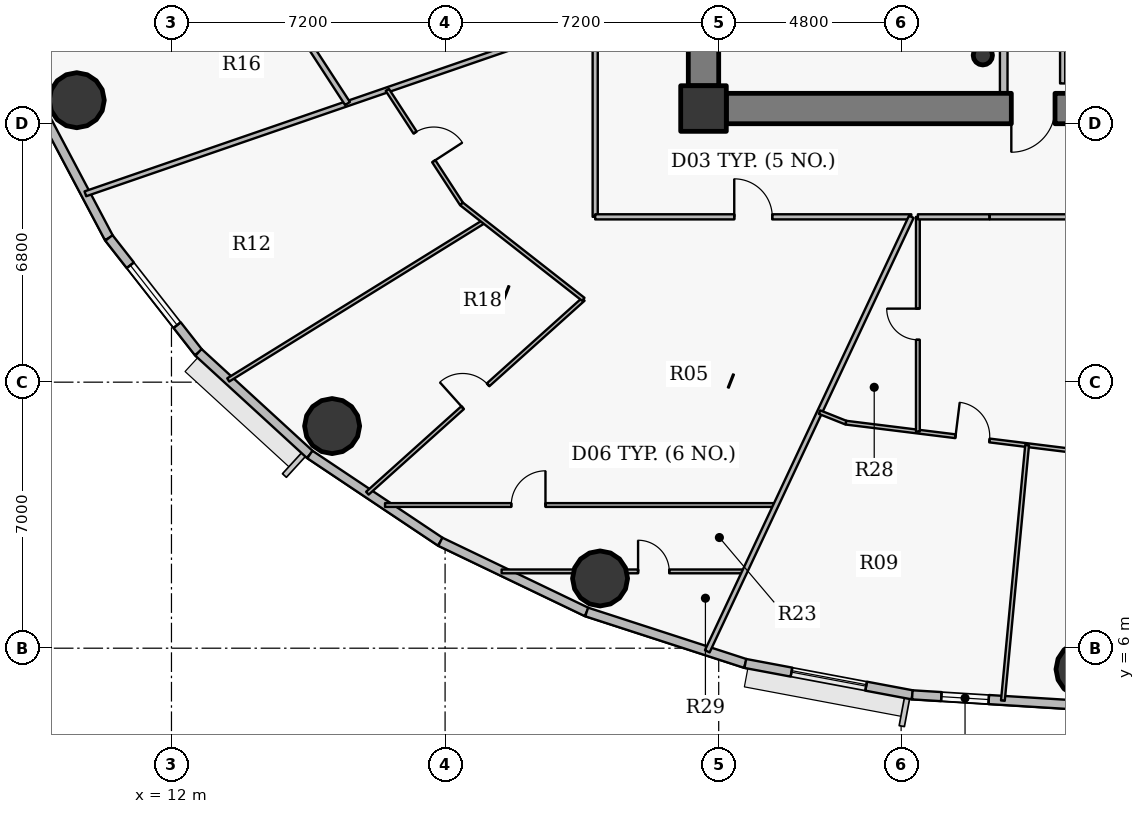
"""IFC4 building model, lengths in metres.
Left out: names, types, materials, properties, quantities, classifications, styles, units other than length and angle.
Written with IfcOpenShell. Run it as: python <this file> out.ifc"""

import sys

from ifc_helpers import new_model, si_unit, direction, frame, frame_2d, origin, origin_2d, place, context, subcontext, project, spatial, rectangle, hollow_circle, extrude, source, transform, mapped, element, fill, save


model = new_model("IFC4")
c1 = context("Model", 3, precision=1e-05, world=origin(), true_north=direction((0.0, 1.0)))
c2 = subcontext(c1, "Body", "Model", "MODEL_VIEW")
j1 = project(units=[si_unit("LENGTHUNIT", "METRE"), si_unit("PLANEANGLEUNIT", "RADIAN")], contexts=[c1])
p1 = place(None, origin())
s1 = spatial("IfcSite", under=j1, at=p1, CompositionType="ELEMENT")
p2 = place(p1, origin())
s2 = spatial("IfcBuilding", under=s1, at=p2, CompositionType="ELEMENT")
p3 = place(p2, frame((0.0, 0.0, 134.7)))
s3 = spatial("IfcBuildingStorey", under=s2, at=p3, CompositionType="ELEMENT", Elevation=134.7)
p4 = place(p3, frame((26.0, 20.2, 0.0), z_axis=(0.0, 0.0, 1.0), x_axis=(1.0, 0.0, 0.0)))
e1 = element("IfcColumn", 1, at=p4, inside=s3, PredefinedType="COLUMN", context=c2, shape_type="SweptSolid", body=[
    extrude(rectangle(XDim=1.2, YDim=1.2, at=origin_2d()), origin(), (0.0, 0.0, 1.0), 3.75),
])
p5 = place(p3, frame((33.35, 21.6, 0.0), z_axis=(0.0, 0.0, 1.0), x_axis=(1.0, 0.0, 0.0)))
e2 = element("IfcColumn", 2, at=p5, inside=s3, PredefinedType="COLUMN", context=c2, shape_type="SweptSolid", body=[
    extrude(hollow_circle(Radius=0.254, WallThickness=0.02, at=origin_2d()), origin(), (0.0, 0.0, 1.0), 3.75),
])
p6 = place(p3, frame((45.4, 20.2, 0.0), z_axis=(0.0, 0.0, 1.0), x_axis=(-1.0, 0.0, 0.0)))
e3 = element("IfcWall", 3, at=p6, inside=s3, PredefinedType="SHEAR", context=c2, shape_type="SweptSolid", body=[
    extrude(rectangle(XDim=18.8, YDim=0.8, at=frame_2d((9.4, 0.0))), origin(), (0.0, 0.0, 1.0), 2.95),
])
p7 = place(p6, frame((10.15, 0.0, 0.0)))
e4 = element("IfcOpeningElement", 4, at=p7, cuts=e3, PredefinedType="OPENING", context=c2, shape_type="SweptSolid", body=[
    extrude(rectangle(XDim=1.15, YDim=2.15, at=origin_2d()), frame((0.575, 0.41, 1.075), z_axis=(0.0, -1.0, 0.0), x_axis=(1.0, 0.0, 0.0)), (0.0, 0.0, 1.0), 0.82),
])
p8 = place(p3, frame((26.0, 20.8, 0.0), z_axis=(0.0, 0.0, 1.0), x_axis=(0.0, 1.0, 0.0)))
e5 = element("IfcWall", 5, at=p8, inside=s3, PredefinedType="SHEAR", context=c2, shape_type="SweptSolid", body=[
    extrude(rectangle(XDim=12.4, YDim=0.8, at=frame_2d((6.2, 0.0))), origin(), (0.0, 0.0, 1.0), 2.95),
])
p9 = place(p8, frame((5.79, 0.0, 0.0)))
e6 = element("IfcOpeningElement", 6, at=p9, cuts=e5, PredefinedType="OPENING", context=c2, shape_type="SweptSolid", body=[
    extrude(rectangle(XDim=0.82, YDim=2.1, at=origin_2d()), frame((0.41, 0.41, 1.05), z_axis=(0.0, -1.0, 0.0), x_axis=(1.0, 0.0, 0.0)), (0.0, 0.0, 1.0), 0.82),
])
for number, where, z_axis, x_axis in (
    (7, (9.507, 20.419, 0.0), (0.0, 0.0, 1.0), (1.0, 0.0, 0.0)),
    (8, (16.227, 11.844, 0.0), (0.0, 0.0, 1.0), (1.0, 0.0, 0.0)),
    (9, (23.278, 7.835, 0.0), (0.0, 0.0, 1.0), (1.0, 0.0, 0.0)),
    (10, (36.0, 5.445, 0.0), (0.0, 0.0, 1.0), (1.0, 0.0, 0.0)),
):
    element("IfcColumn", number, at=place(p3, frame(where, z_axis=z_axis, x_axis=x_axis)), inside=s3, PredefinedType="COLUMN", context=c2, shape_type="SweptSolid", body=[
        extrude(hollow_circle(Radius=0.725, WallThickness=0.042, at=origin_2d()), origin(), (0.0, 0.0, 1.0), 3.75),
    ])
p10 = place(p3, frame((10.355, 16.794, 0.0), z_axis=(0.0, 0.0, 1.0), x_axis=(-0.467614004126, 0.883932770716, 0.0)))
e11 = element("IfcWall", 11, at=p10, inside=s3, PredefinedType="SOLIDWALL", context=c2, shape_type="SweptSolid", body=[
    extrude(rectangle(XDim=3.689, YDim=0.24, at=frame_2d((1.844, 0.0))), origin(), (0.0, 0.0, 1.0), 3.5),
])
p11 = place(p3, frame((12.711, 13.783, 0.0), z_axis=(0.0, 0.0, 1.0), x_axis=(-0.616272103517, 0.787533297345, 0.0)))
e12 = element("IfcWall", 12, at=p11, inside=s3, PredefinedType="SOLIDWALL", context=c2, shape_type="SweptSolid", body=[
    extrude(rectangle(XDim=3.823, YDim=0.24, at=frame_2d((1.912, 0.0))), origin(), (0.0, 0.0, 1.0), 3.5),
])
p12 = place(p11, frame((0.912, 0.0, 0.9)))
e13 = element("IfcOpeningElement", 13, at=p12, cuts=e12, PredefinedType="OPENING", context=c2, shape_type="SweptSolid", body=[
    extrude(rectangle(XDim=2.0, YDim=1.75, at=origin_2d()), frame((1.0, 0.13, 0.875), z_axis=(0.0, -1.0, 0.0), x_axis=(1.0, 0.0, 0.0)), (0.0, 0.0, 1.0), 0.26),
])
p13 = place(p3, frame((15.642, 11.097, 0.0), z_axis=(0.0, 0.0, 1.0), x_axis=(-0.737113356241, 0.675769117414, 0.0)))
e14 = element("IfcWall", 14, at=p13, inside=s3, PredefinedType="SOLIDWALL", context=c2, shape_type="SweptSolid", body=[
    extrude(rectangle(XDim=3.976, YDim=0.24, at=frame_2d((1.988, 0.0))), origin(), (0.0, 0.0, 1.0), 3.5),
])
p14 = place(p3, frame((19.075, 8.801, 0.0), z_axis=(0.0, 0.0, 1.0), x_axis=(-0.831221811447, 0.555940914284, 0.0)))
e15 = element("IfcWall", 15, at=p14, inside=s3, PredefinedType="SOLIDWALL", context=c2, shape_type="SweptSolid", body=[
    extrude(rectangle(XDim=4.13, YDim=0.24, at=frame_2d((2.065, 0.0))), origin(), (0.0, 0.0, 1.0), 3.5),
])
p15 = place(p3, frame((22.926, 6.953, 0.0), z_axis=(0.0, 0.0, 1.0), x_axis=(-0.901589935876, 0.432591709962, 0.0)))
e16 = element("IfcWall", 16, at=p15, inside=s3, PredefinedType="SOLIDWALL", context=c2, shape_type="SweptSolid", body=[
    extrude(rectangle(XDim=4.272, YDim=0.24, at=frame_2d((2.136, 0.0))), origin(), (0.0, 0.0, 1.0), 3.5),
])
p16 = place(p3, frame((27.1, 5.599, 0.0), z_axis=(0.0, 0.0, 1.0), x_axis=(-0.951211346073, 0.308540070495, 0.0)))
e17 = element("IfcWall", 17, at=p16, inside=s3, PredefinedType="SOLIDWALL", context=c2, shape_type="SweptSolid", body=[
    extrude(rectangle(XDim=4.388, YDim=0.24, at=frame_2d((2.194, 0.0))), origin(), (0.0, 0.0, 1.0), 3.5),
])
p17 = place(p3, frame((31.494, 4.773, 0.0), z_axis=(0.0, 0.0, 1.0), x_axis=(-0.982789252177, 0.184730305596, 0.0)))
e18 = element("IfcWall", 18, at=p17, inside=s3, PredefinedType="SOLIDWALL", context=c2, shape_type="SweptSolid", body=[
    extrude(rectangle(XDim=4.471, YDim=0.24, at=frame_2d((2.235, 0.0))), origin(), (0.0, 0.0, 1.0), 3.5),
])
p18 = place(p17, frame((1.236, 0.0, 0.9)))
e19 = element("IfcOpeningElement", 19, at=p18, cuts=e18, PredefinedType="OPENING", context=c2, shape_type="SweptSolid", body=[
    extrude(rectangle(XDim=2.0, YDim=1.75, at=origin_2d()), frame((1.0, 0.13, 0.875), z_axis=(0.0, -1.0, 0.0), x_axis=(1.0, 0.0, 0.0)), (0.0, 0.0, 1.0), 0.26),
])
p19 = place(p3, frame((36.0, 4.495, 0.0), z_axis=(0.0, 0.0, 1.0), x_axis=(-0.998107531589, 0.061492726276, 0.0)))
e20 = element("IfcWall", 20, at=p19, inside=s3, PredefinedType="SOLIDWALL", context=c2, shape_type="SweptSolid", body=[
    extrude(rectangle(XDim=4.514, YDim=0.24, at=frame_2d((2.257, 0.0))), origin(), (0.0, 0.0, 1.0), 3.5),
])
p20 = place(p19, frame((2.499, 0.0, 0.9)))
e21 = element("IfcOpeningElement", 21, at=p20, cuts=e20, PredefinedType="OPENING", context=c2, shape_type="SweptSolid", body=[
    extrude(rectangle(XDim=1.25, YDim=1.65, at=origin_2d()), frame((0.625, 0.13, 0.825), z_axis=(0.0, -1.0, 0.0), x_axis=(1.0, 0.0, 0.0)), (0.0, 0.0, 1.0), 0.26),
])
p21 = place(p3, frame((9.735, 17.956, 0.0), z_axis=(0.0, 0.0, 1.0), x_axis=(0.945515704768, 0.325576491836, 0.0)))
e22 = element("IfcWall", 22, at=p21, inside=s3, PredefinedType="PARTITIONING", context=c2, shape_type="SweptSolid", body=[
    extrude(rectangle(XDim=14.188, YDim=0.135, at=frame_2d((7.094, 0.0))), origin(), (0.0, 0.0, 1.0), 2.935),
])
p22 = place(p3, frame((13.494, 13.059, 0.0), z_axis=(0.0, 0.0, 1.0), x_axis=(0.850110644983, 0.526604112486, 0.0)))
e23 = element("IfcWall", 23, at=p22, inside=s3, PredefinedType="PARTITIONING", context=c2, shape_type="SweptSolid", body=[
    extrude(rectangle(XDim=7.916, YDim=0.1, at=frame_2d((3.958, 0.0))), origin(), (0.0, 0.0, 1.0), 2.935),
])
p23 = place(p3, frame((15.661, 21.825, 0.0), z_axis=(0.0, 0.0, 1.0), x_axis=(0.54543603077, -0.838152454114, 0.0)))
e24 = element("IfcWall", 24, at=p23, inside=s3, PredefinedType="PARTITIONING", context=c2, shape_type="SweptSolid", body=[
    extrude(rectangle(XDim=1.782, YDim=0.15, at=frame_2d((0.891, 0.0))), origin(), (0.0, 0.0, 1.0), 2.935),
])
p24 = place(p3, frame((17.155, 10.078, 0.0), z_axis=(0.0, 0.0, 1.0), x_axis=(0.744051955022, 0.668121761528, 0.0)))
e25 = element("IfcWall", 25, at=p24, inside=s3, PredefinedType="PARTITIONING", context=c2, shape_type="SweptSolid", body=[
    extrude(rectangle(XDim=7.636, YDim=0.1, at=frame_2d((3.818, 0.0))), origin(), (0.0, 0.0, 1.0), 2.935),
])
p25 = place(p24, frame((3.368, 0.0, 0.0)))
e26 = element("IfcOpeningElement", 26, at=p25, cuts=e25, PredefinedType="OPENING", context=c2, shape_type="SweptSolid", body=[
    extrude(rectangle(XDim=0.9, YDim=2.1, at=origin_2d()), frame((0.45, 0.06, 1.05), z_axis=(0.0, -1.0, 0.0), x_axis=(1.0, 0.0, 0.0)), (0.0, 0.0, 1.0), 0.12),
])
p26 = place(p3, frame((17.62, 9.768, 0.0), z_axis=(0.0, 0.0, 1.0), x_axis=(1.0, 0.0, 0.0)))
e27 = element("IfcWall", 27, at=p26, inside=s3, PredefinedType="PARTITIONING", context=c2, shape_type="SweptSolid", body=[
    extrude(rectangle(XDim=10.288, YDim=0.1, at=frame_2d((5.144, 0.0))), origin(), (0.0, 0.0, 1.0), 2.935),
])
p27 = place(p26, frame((3.322, 0.0, 0.0)))
e28 = element("IfcOpeningElement", 28, at=p27, cuts=e27, PredefinedType="OPENING", context=c2, shape_type="SweptSolid", body=[
    extrude(rectangle(XDim=0.9, YDim=2.1, at=origin_2d()), frame((0.45, 0.06, 1.05), z_axis=(0.0, -1.0, 0.0), x_axis=(1.0, 0.0, 0.0)), (0.0, 0.0, 1.0), 0.12),
])
p28 = place(p3, frame((17.68, 20.692, 0.0), z_axis=(0.0, 0.0, 1.0), x_axis=(0.545371539428, -0.838194418964, 0.0)))
e29 = element("IfcWall", 29, at=p28, inside=s3, PredefinedType="PARTITIONING", context=c2, shape_type="SweptSolid", body=[
    extrude(rectangle(XDim=3.583, YDim=0.1, at=frame_2d((1.791, 0.0))), origin(), (0.0, 0.0, 1.0), 3.5),
])
p29 = place(p28, frame((1.341, 0.0, 0.0)))
e30 = element("IfcOpeningElement", 30, at=p29, cuts=e29, PredefinedType="OPENING", context=c2, shape_type="SweptSolid", body=[
    extrude(rectangle(XDim=0.9, YDim=2.1, at=origin_2d()), frame((0.45, 0.06, 1.05), z_axis=(0.0, -1.0, 0.0), x_axis=(1.0, 0.0, 0.0)), (0.0, 0.0, 1.0), 0.12),
])
p30 = place(p3, frame((19.634, 17.689, 0.0), z_axis=(0.0, 0.0, 1.0), x_axis=(0.787341639438, -0.616516944461, 0.0)))
e31 = element("IfcWall", 31, at=p30, inside=s3, PredefinedType="PARTITIONING", context=c2, shape_type="SweptSolid", body=[
    extrude(rectangle(XDim=4.069, YDim=0.1, at=frame_2d((2.034, 0.0))), origin(), (0.0, 0.0, 1.0), 2.935),
])
p31 = place(p3, frame((20.688, 8.021, 0.0), z_axis=(0.0, 0.0, 1.0), x_axis=(1.0, 0.0, 0.0)))
e32 = element("IfcWall", 32, at=p31, inside=s3, PredefinedType="PARTITIONING", context=c2, shape_type="SweptSolid", body=[
    extrude(rectangle(XDim=6.399, YDim=0.1, at=frame_2d((3.2, 0.0))), origin(), (0.0, 0.0, 1.0), 2.935),
])
p32 = place(p31, frame((3.591, 0.0, 0.0)))
e33 = element("IfcOpeningElement", 33, at=p32, cuts=e32, PredefinedType="OPENING", context=c2, shape_type="SweptSolid", body=[
    extrude(rectangle(XDim=0.82, YDim=2.1, at=origin_2d()), frame((0.41, 0.06, 1.05), z_axis=(0.0, -1.0, 0.0), x_axis=(1.0, 0.0, 0.0)), (0.0, 0.0, 1.0), 0.12),
])
p33 = place(p3, frame((23.15, 17.35, 0.0), z_axis=(0.0, 0.0, 1.0), x_axis=(0.0, 1.0, 0.0)))
e34 = element("IfcWall", 34, at=p33, inside=s3, PredefinedType="PARTITIONING", context=c2, shape_type="SweptSolid", body=[
    extrude(rectangle(XDim=19.3, YDim=0.135, at=frame_2d((9.65, 0.0))), origin(), (0.0, 0.0, 1.0), 2.935),
])
p34 = place(p33, frame((11.733, 0.0, 0.0)))
e35 = element("IfcOpeningElement", 35, at=p34, cuts=e34, PredefinedType="OPENING", context=c2, shape_type="SweptSolid", body=[
    extrude(rectangle(XDim=1.05, YDim=2.15, at=origin_2d()), frame((0.525, 0.078, 1.075), z_axis=(0.0, -1.0, 0.0), x_axis=(1.0, 0.0, 0.0)), (0.0, 0.0, 1.0), 0.155),
])
p35 = place(p33, frame((6.074, 0.0, 0.0)))
e36 = element("IfcOpeningElement", 36, at=p35, cuts=e34, PredefinedType="OPENING", context=c2, shape_type="SweptSolid", body=[
    extrude(rectangle(XDim=0.82, YDim=2.1, at=origin_2d()), frame((0.41, 0.078, 1.05), z_axis=(0.0, -1.0, 0.0), x_axis=(1.0, 0.0, 0.0)), (0.0, 0.0, 1.0), 0.155),
])
p36 = place(p3, frame((23.15, 17.35, 0.0), z_axis=(0.0, 0.0, 1.0), x_axis=(1.0, 0.0, 0.0)))
e37 = element("IfcWall", 37, at=p36, inside=s3, PredefinedType="PARTITIONING", context=c2, shape_type="SweptSolid", body=[
    extrude(rectangle(XDim=8.318, YDim=0.135, at=frame_2d((4.159, 0.0))), origin(), (0.0, 0.0, 1.0), 2.935),
])
p37 = place(p36, frame((3.659, 0.0, 0.0)))
e38 = element("IfcOpeningElement", 38, at=p37, cuts=e37, PredefinedType="OPENING", context=c2, shape_type="SweptSolid", body=[
    extrude(rectangle(XDim=1.0, YDim=2.15, at=origin_2d()), frame((0.5, 0.078, 1.075), z_axis=(0.0, -1.0, 0.0), x_axis=(1.0, 0.0, 0.0)), (0.0, 0.0, 1.0), 0.155),
])
p38 = place(p3, frame((26.1, 5.918, 0.0), z_axis=(0.0, 0.0, 1.0), x_axis=(0.425072644526, 0.905159238408, 0.0)))
e39 = element("IfcWall", 39, at=p38, inside=s3, PredefinedType="PARTITIONING", context=c2, shape_type="SweptSolid", body=[
    extrude(rectangle(XDim=12.63, YDim=0.135, at=frame_2d((6.315, 0.0))), origin(), (0.0, 0.0, 1.0), 2.935),
])
p39 = place(p3, frame((29.055, 12.211, 0.0), z_axis=(0.0, 0.0, 1.0), x_axis=(0.928859514795, -0.370432182423, 0.0)))
e40 = element("IfcWall", 40, at=p39, inside=s3, PredefinedType="PARTITIONING", context=c2, shape_type="SweptSolid", body=[
    extrude(rectangle(XDim=0.747, YDim=0.1, at=frame_2d((0.374, 0.0))), origin(), (0.0, 0.0, 1.0), 3.5),
])
p40 = place(p3, frame((29.749, 11.934, 0.0), z_axis=(0.0, 0.0, 1.0), x_axis=(0.992395485088, -0.123090215599, 0.0)))
e41 = element("IfcWall", 41, at=p40, inside=s3, PredefinedType="PARTITIONING", context=c2, shape_type="SweptSolid", body=[
    extrude(rectangle(XDim=6.299, YDim=0.1, at=frame_2d((3.15, 0.0))), origin(), (0.0, 0.0, 1.0), 2.935),
])
p41 = place(p40, frame((2.905, 0.0, 0.0)))
e42 = element("IfcOpeningElement", 42, at=p41, cuts=e41, PredefinedType="OPENING", context=c2, shape_type="SweptSolid", body=[
    extrude(rectangle(XDim=0.9, YDim=2.1, at=origin_2d()), frame((0.45, 0.06, 1.05), z_axis=(0.0, -1.0, 0.0), x_axis=(1.0, 0.0, 0.0)), (0.0, 0.0, 1.0), 0.12),
])
p42 = place(p3, frame((31.641, 11.7, 0.0), z_axis=(0.0, 0.0, 1.0), x_axis=(0.0, 1.0, 0.0)))
e43 = element("IfcWall", 43, at=p42, inside=s3, PredefinedType="PARTITIONING", context=c2, shape_type="SweptSolid", body=[
    extrude(rectangle(XDim=5.65, YDim=0.1, at=frame_2d((2.825, 0.0))), origin(), (0.0, 0.0, 1.0), 3.5),
])
p43 = place(p42, frame((2.415, 0.0, 0.0)))
e44 = element("IfcOpeningElement", 44, at=p43, cuts=e43, PredefinedType="OPENING", context=c2, shape_type="SweptSolid", body=[
    extrude(rectangle(XDim=0.82, YDim=2.1, at=origin_2d()), frame((0.41, 0.06, 1.05), z_axis=(0.0, -1.0, 0.0), x_axis=(1.0, 0.0, 0.0)), (0.0, 0.0, 1.0), 0.12),
])
p44 = place(p3, frame((31.641, 17.35, 0.0), z_axis=(0.0, 0.0, 1.0), x_axis=(1.0, 0.0, 0.0)))
e45 = element("IfcWall", 45, at=p44, inside=s3, PredefinedType="PARTITIONING", context=c2, shape_type="SweptSolid", body=[
    extrude(rectangle(XDim=1.882, YDim=0.135, at=frame_2d((0.941, 0.0))), origin(), (0.0, 0.0, 1.0), 3.5),
])
p45 = place(p3, frame((33.878, 4.621, 0.0), z_axis=(0.0, 0.0, 1.0), x_axis=(0.094368865944, 0.995537300728, 0.0)))
e46 = element("IfcWall", 46, at=p45, inside=s3, PredefinedType="PARTITIONING", context=c2, shape_type="SweptSolid", body=[
    extrude(rectangle(XDim=6.752, YDim=0.1, at=frame_2d((3.376, 0.0))), origin(), (0.0, 0.0, 1.0), 2.935),
])
p46 = place(p3, frame((33.9, 20.6, 0.0), z_axis=(0.0, 0.0, 1.0), x_axis=(0.0, 1.0, 0.0)))
e47 = element("IfcWall", 47, at=p46, inside=s3, PredefinedType="PARTITIONING", context=c2, shape_type="SweptSolid", body=[
    extrude(rectangle(XDim=11.5, YDim=0.2, at=frame_2d((5.75, 0.0))), origin(), (0.0, 0.0, 1.0), 3.085),
])
p47 = place(p3, frame((35.45, 21.89, 0.0), z_axis=(0.0, 0.0, 1.0), x_axis=(0.0, -1.0, 0.0)))
e48 = element("IfcWall", 48, at=p47, inside=s3, PredefinedType="PARTITIONING", context=c2, shape_type="SweptSolid", body=[
    extrude(rectangle(XDim=1.03, YDim=0.135, at=frame_2d((0.515, 0.0))), origin(), (0.0, 0.0, 1.0), 3.085),
])
p48 = place(p3, frame((38.467, 17.35, 0.0), z_axis=(0.0, 0.0, 1.0), x_axis=(-1.0, 0.0, 0.0)))
e49 = element("IfcWall", 49, at=p48, inside=s3, PredefinedType="PARTITIONING", context=c2, shape_type="SweptSolid", body=[
    extrude(rectangle(XDim=4.934, YDim=0.135, at=frame_2d((2.467, 0.0))), origin(), (0.0, 0.0, 1.0), 2.935),
])
p49 = place(p3, frame((25.6, 20.79, 0.0), z_axis=(0.0, 0.0, 1.0), x_axis=(0.0, -1.0, 0.0)))
e50 = element("IfcWall", 50, at=p49, inside=s3, PredefinedType="PARTITIONING", context=c2, shape_type="SweptSolid", body=[
    extrude(rectangle(XDim=0.99, YDim=0.135, at=frame_2d((0.495, 0.0))), origin(), (0.0, 0.0, 1.0), 3.5),
])
p50 = place(p3, frame((25.907, 19.8, 0.0), z_axis=(0.0, 0.0, 1.0), x_axis=(1.0, 0.0, 0.0)))
e51 = element("IfcWall", 51, at=p50, inside=s3, PredefinedType="PARTITIONING", context=c2, shape_type="SweptSolid", body=[
    extrude(rectangle(XDim=0.683, YDim=0.135, at=frame_2d((0.341, 0.0))), origin(), (0.0, 0.0, 1.0), 2.935),
])
m1 = source(origin(), c2, "Body", "SweptSolid", [
    extrude(rectangle(XDim=2.0, YDim=1.75, at=origin_2d()), frame((1.0, 0.03, 0.875), z_axis=(0.0, -1.0, 0.0), x_axis=(1.0, 0.0, 0.0)), (0.0, 0.0, 1.0), 0.06),
])
p51 = place(p12, origin())
e52 = element("IfcWindow", 52, at=p51, inside=s3, PartitioningType="DOUBLE_PANEL_VERTICAL", PredefinedType="WINDOW", context=c2, shape_type="MappedRepresentation", body=[
    mapped(m1, transform((0.0, 0.0, 0.0), x_axis=(1.0, 0.0, 0.0), y_axis=(0.0, 1.0, 0.0), z_axis=(0.0, 0.0, 1.0), scale=1.0)),
])
fill(e13, e52)
p52 = place(p18, origin())
e53 = element("IfcWindow", 53, at=p52, inside=s3, PartitioningType="DOUBLE_PANEL_VERTICAL", PredefinedType="WINDOW", context=c2, shape_type="MappedRepresentation", body=[
    mapped(m1, transform((0.0, 0.0, 0.0), x_axis=(1.0, 0.0, 0.0), y_axis=(0.0, 1.0, 0.0), z_axis=(0.0, 0.0, 1.0), scale=1.0)),
])
fill(e19, e53)
m2 = source(origin(), c2, "Body", "SweptSolid", [
    extrude(rectangle(XDim=1.25, YDim=1.65, at=origin_2d()), frame((0.625, 0.03, 0.825), z_axis=(0.0, -1.0, 0.0), x_axis=(1.0, 0.0, 0.0)), (0.0, 0.0, 1.0), 0.06),
])
p53 = place(p20, origin())
e54 = element("IfcWindow", 54, at=p53, inside=s3, PartitioningType="SINGLE_PANEL", PredefinedType="WINDOW", context=c2, shape_type="MappedRepresentation", body=[
    mapped(m2, transform((0.0, 0.0, 0.0), x_axis=(1.0, 0.0, 0.0), y_axis=(0.0, 1.0, 0.0), z_axis=(0.0, 0.0, 1.0), scale=1.0)),
])
fill(e21, e54)
m3 = source(origin(), c2, "Body", "SweptSolid", [
    extrude(rectangle(XDim=1.15, YDim=2.15, at=origin_2d()), frame((0.575, 0.025, 1.075), z_axis=(0.0, -1.0, 0.0), x_axis=(1.0, 0.0, 0.0)), (0.0, 0.0, 1.0), 0.05),
])
p54 = place(p7, origin())
e55 = element("IfcDoor", 55, at=p54, inside=s3, OperationType="SINGLE_SWING_RIGHT", PredefinedType="DOOR", context=c2, shape_type="MappedRepresentation", body=[
    mapped(m3, transform((0.0, 0.0, 0.0), x_axis=(1.0, 0.0, 0.0), y_axis=(0.0, 1.0, 0.0), z_axis=(0.0, 0.0, 1.0), scale=1.0)),
])
fill(e4, e55)
m4 = source(origin(), c2, "Body", "SweptSolid", [
    extrude(rectangle(XDim=1.0, YDim=2.15, at=origin_2d()), frame((0.5, 0.025, 1.075), z_axis=(0.0, -1.0, 0.0), x_axis=(1.0, 0.0, 0.0)), (0.0, 0.0, 1.0), 0.05),
])
p55 = place(p37, origin())
e56 = element("IfcDoor", 56, at=p55, inside=s3, OperationType="SINGLE_SWING_LEFT", PredefinedType="DOOR", context=c2, shape_type="MappedRepresentation", body=[
    mapped(m4, transform((0.0, 0.0, 0.0), x_axis=(1.0, 0.0, 0.0), y_axis=(0.0, 1.0, 0.0), z_axis=(0.0, 0.0, 1.0), scale=1.0)),
])
fill(e38, e56)
m5 = source(origin(), c2, "Body", "SweptSolid", [
    extrude(rectangle(XDim=0.9, YDim=2.1, at=origin_2d()), frame((0.45, 0.025, 1.05), z_axis=(0.0, -1.0, 0.0), x_axis=(1.0, 0.0, 0.0)), (0.0, 0.0, 1.0), 0.05),
])
p56 = place(p29, origin())
e57 = element("IfcDoor", 57, at=p56, inside=s3, OperationType="SINGLE_SWING_RIGHT", PredefinedType="DOOR", context=c2, shape_type="MappedRepresentation", body=[
    mapped(m5, transform((0.0, 0.0, 0.0), x_axis=(1.0, 0.0, 0.0), y_axis=(0.0, 1.0, 0.0), z_axis=(0.0, 0.0, 1.0), scale=1.0)),
])
fill(e30, e57)
p57 = place(p25, origin())
e58 = element("IfcDoor", 58, at=p57, inside=s3, OperationType="SINGLE_SWING_LEFT", PredefinedType="DOOR", context=c2, shape_type="MappedRepresentation", body=[
    mapped(m5, transform((0.0, 0.0, 0.0), x_axis=(1.0, 0.0, 0.0), y_axis=(0.0, 1.0, 0.0), z_axis=(0.0, 0.0, 1.0), scale=1.0)),
])
fill(e26, e58)
p58 = place(p27, origin())
e59 = element("IfcDoor", 59, at=p58, inside=s3, OperationType="SINGLE_SWING_RIGHT", PredefinedType="DOOR", context=c2, shape_type="MappedRepresentation", body=[
    mapped(m5, transform((0.0, 0.0, 0.0), x_axis=(1.0, 0.0, 0.0), y_axis=(0.0, 1.0, 0.0), z_axis=(0.0, 0.0, 1.0), scale=1.0)),
])
fill(e28, e59)
m6 = source(origin(), c2, "Body", "SweptSolid", [
    extrude(rectangle(XDim=0.82, YDim=2.1, at=origin_2d()), frame((0.41, 0.025, 1.05), z_axis=(0.0, -1.0, 0.0), x_axis=(1.0, 0.0, 0.0)), (0.0, 0.0, 1.0), 0.05),
])
p59 = place(p32, origin())
e60 = element("IfcDoor", 60, at=p59, inside=s3, OperationType="SINGLE_SWING_LEFT", PredefinedType="DOOR", context=c2, shape_type="MappedRepresentation", body=[
    mapped(m6, transform((0.0, 0.0, 0.0), x_axis=(1.0, 0.0, 0.0), y_axis=(0.0, 1.0, 0.0), z_axis=(0.0, 0.0, 1.0), scale=1.0)),
])
fill(e33, e60)
p60 = place(p41, origin())
e61 = element("IfcDoor", 61, at=p60, inside=s3, OperationType="SINGLE_SWING_LEFT", PredefinedType="DOOR", context=c2, shape_type="MappedRepresentation", body=[
    mapped(m5, transform((0.0, 0.0, 0.0), x_axis=(1.0, 0.0, 0.0), y_axis=(0.0, 1.0, 0.0), z_axis=(0.0, 0.0, 1.0), scale=1.0)),
])
fill(e42, e61)
p61 = place(p43, origin())
e62 = element("IfcDoor", 62, at=p61, inside=s3, OperationType="SINGLE_SWING_RIGHT", PredefinedType="DOOR", context=c2, shape_type="MappedRepresentation", body=[
    mapped(m6, transform((0.0, 0.0, 0.0), x_axis=(1.0, 0.0, 0.0), y_axis=(0.0, 1.0, 0.0), z_axis=(0.0, 0.0, 1.0), scale=1.0)),
])
fill(e44, e62)
save(model, sys.argv[1])
